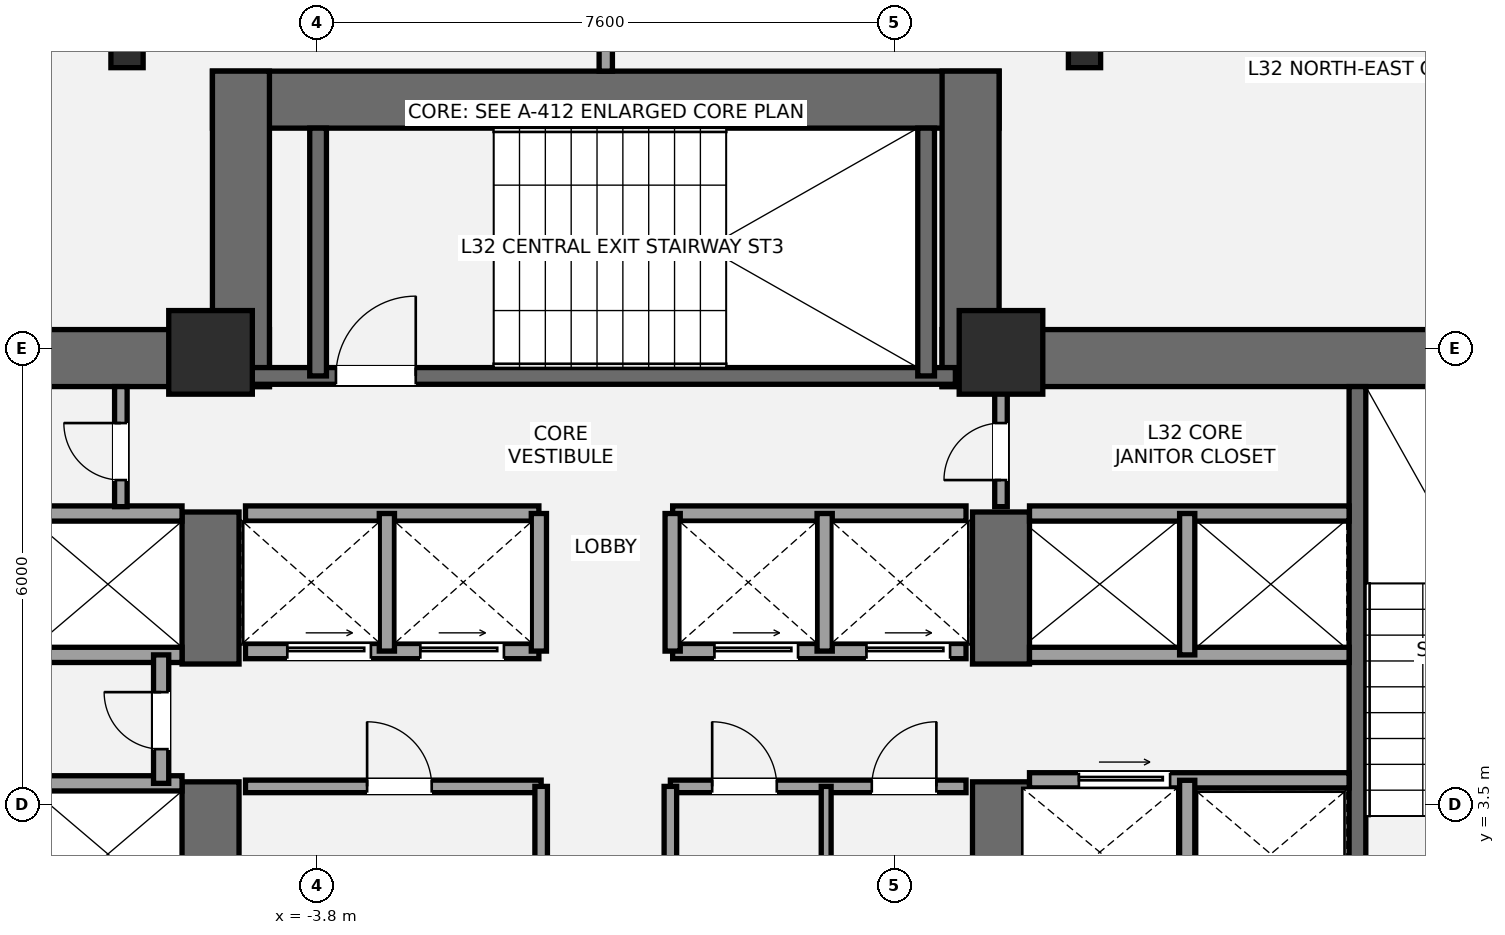
"""IFC4 building model, lengths in metres.
Left out: names, types, materials, properties, quantities, classifications, styles, units other than length and angle.
Written with IfcOpenShell. Run it as: python <this file> out.ifc"""

import sys

from ifc_helpers import new_model, si_unit, direction, frame, frame_2d, origin, origin_2d, place, context, subcontext, project, spatial, rectangle, i_section, extrude, element, fill, save


model = new_model("IFC4")
c1 = context("Model", 3, precision=1e-05, world=origin(), true_north=direction((0.0, 1.0)))
c2 = subcontext(c1, "Body", "Model", "MODEL_VIEW")
j1 = project(units=[si_unit("LENGTHUNIT", "METRE"), si_unit("PLANEANGLEUNIT", "RADIAN")], contexts=[c1])
p1 = place(None, origin())
s1 = spatial("IfcSite", under=j1, at=p1, CompositionType="ELEMENT")
p2 = place(p1, origin())
s2 = spatial("IfcBuilding", under=s1, at=p2, CompositionType="ELEMENT")
p3 = place(p2, frame((0.0, 0.0, 121.1)))
s3 = spatial("IfcBuildingStorey", under=s2, at=p3, CompositionType="ELEMENT", Elevation=121.1)
p4 = place(p3, frame((-13.9, 9.375, 0.0), z_axis=(0.0, 0.0, 1.0), x_axis=(1.0, 0.0, 0.0)))
e1 = element("IfcWall", 1, at=p4, inside=s3, PredefinedType="SHEAR", context=c2, shape_type="SweptSolid", body=[
    extrude(rectangle(XDim=9.475, YDim=0.75, at=frame_2d((4.737, 0.0))), origin(), (0.0, 0.0, 1.0), 3.5),
])
p5 = place(p3, frame((-5.2, 1.1, 0.0), z_axis=(0.0, 0.0, 1.0), x_axis=(0.0, 1.0, 0.0)))
e2 = element("IfcWall", 2, at=p5, inside=s3, PredefinedType="SHEAR", context=c2, shape_type="SweptSolid", body=[
    extrude(rectangle(XDim=2.7, YDim=0.75, at=frame_2d((1.35, 0.0))), origin(), (0.0, 0.0, 1.0), 3.5),
])
p6 = place(p3, frame((-5.2, 5.35, 0.0), z_axis=(0.0, 0.0, 1.0), x_axis=(0.0, 1.0, 0.0)))
e3 = element("IfcWall", 3, at=p6, inside=s3, PredefinedType="SHEAR", context=c2, shape_type="SweptSolid", body=[
    extrude(rectangle(XDim=2.0, YDim=0.75, at=frame_2d((1.0, 0.0))), origin(), (0.0, 0.0, 1.0), 3.5),
])
p7 = place(p3, frame((4.425, 9.375, 0.0), z_axis=(0.0, 0.0, 1.0), x_axis=(1.0, 0.0, 0.0)))
e4 = element("IfcWall", 4, at=p7, inside=s3, PredefinedType="SHEAR", context=c2, shape_type="SweptSolid", body=[
    extrude(rectangle(XDim=9.475, YDim=0.75, at=frame_2d((4.737, 0.0))), origin(), (0.0, 0.0, 1.0), 3.5),
])
p8 = place(p3, frame((5.2, 1.1, 0.0), z_axis=(0.0, 0.0, 1.0), x_axis=(0.0, 1.0, 0.0)))
e5 = element("IfcWall", 5, at=p8, inside=s3, PredefinedType="SHEAR", context=c2, shape_type="SweptSolid", body=[
    extrude(rectangle(XDim=2.7, YDim=0.75, at=frame_2d((1.35, 0.0))), origin(), (0.0, 0.0, 1.0), 3.5),
])
p9 = place(p3, frame((5.2, 5.35, 0.0), z_axis=(0.0, 0.0, 1.0), x_axis=(0.0, 1.0, 0.0)))
e6 = element("IfcWall", 6, at=p9, inside=s3, PredefinedType="SHEAR", context=c2, shape_type="SweptSolid", body=[
    extrude(rectangle(XDim=2.0, YDim=0.75, at=frame_2d((1.0, 0.0))), origin(), (0.0, 0.0, 1.0), 3.5),
])
p10 = place(p3, frame((9.89, 1.85, 0.0), z_axis=(0.0, 0.0, 1.0), x_axis=(0.0, 1.0, 0.0)))
e7 = element("IfcWall", 7, at=p10, inside=s3, PredefinedType="SHEAR", context=c2, shape_type="SweptSolid", body=[
    extrude(rectangle(XDim=7.15, YDim=0.22, at=frame_2d((3.575, 0.0))), origin(), (0.0, 0.0, 1.0), 3.5),
])
p11 = place(p3, frame((-5.175, 12.775, 0.0), z_axis=(0.0, 0.0, 1.0), x_axis=(1.0, 0.0, 0.0)))
e8 = element("IfcWall", 8, at=p11, inside=s3, PredefinedType="SHEAR", context=c2, shape_type="SweptSolid", body=[
    extrude(rectangle(XDim=10.35, YDim=0.75, at=frame_2d((5.175, 0.0))), origin(), (0.0, 0.0, 1.0), 3.5),
])
for number, where, z_axis, x_axis in (
    (9, (-4.8, 9.0, 0.0), (0.0, 0.0, 1.0), (0.0, 1.0, 0.0)),
    (10, (4.8, 9.0, 0.0), (0.0, 0.0, 1.0), (0.0, 1.0, 0.0)),
):
    element("IfcWall", number, at=place(p3, frame(where, z_axis=z_axis, x_axis=x_axis)), inside=s3, PredefinedType="SHEAR", context=c2, shape_type="SweptSolid", body=[
        extrude(rectangle(XDim=4.15, YDim=0.75, at=frame_2d((2.075, 0.0))), origin(), (0.0, 0.0, 1.0), 3.5),
    ])
p12 = place(p3, frame((-4.7, 9.14, 0.0), z_axis=(0.0, 0.0, 1.0), x_axis=(1.0, 0.0, 0.0)))
e11 = element("IfcWall", 11, at=p12, inside=s3, PredefinedType="SHEAR", context=c2, shape_type="SweptSolid", body=[
    extrude(rectangle(XDim=9.3, YDim=0.22, at=frame_2d((4.65, 0.0))), origin(), (0.0, 0.0, 1.0), 3.5),
])
p13 = place(p12, frame((1.15, 0.0, 0.0)))
e12 = element("IfcOpeningElement", 12, at=p13, cuts=e11, PredefinedType="OPENING", context=c2, shape_type="SweptSolid", body=[
    extrude(rectangle(XDim=1.05, YDim=2.15, at=frame_2d((0.525, 1.075))), frame((0.0, 0.12, 0.0), z_axis=(0.0, -1.0, 0.0), x_axis=(1.0, 0.0, 0.0)), (0.0, 0.0, 1.0), 0.24),
])
for number, where, z_axis, x_axis in (
    (13, (-3.785, 9.14, 0.0), (0.0, 0.0, 1.0), (0.0, 1.0, 0.0)),
    (14, (4.215, 9.14, 0.0), (0.0, 0.0, 1.0), (0.0, 1.0, 0.0)),
):
    element("IfcWall", number, at=place(p3, frame(where, z_axis=z_axis, x_axis=x_axis)), inside=s3, PredefinedType="SHEAR", context=c2, shape_type="SweptSolid", body=[
        extrude(rectangle(XDim=3.26, YDim=0.22, at=frame_2d((1.63, 0.0))), origin(), (0.0, 0.0, 1.0), 3.5),
    ])
for number, where, z_axis, x_axis in (
    (15, (-5.2, 9.45, 0.0), (0.0, 0.0, 1.0), (1.0, 0.0, 0.0)),
    (16, (5.2, 9.45, 0.0), (0.0, 0.0, 1.0), (1.0, 0.0, 0.0)),
):
    element("IfcColumn", number, at=place(p3, frame(where, z_axis=z_axis, x_axis=x_axis)), inside=s3, PredefinedType="COLUMN", context=c2, shape_type="SweptSolid", body=[
        extrude(rectangle(XDim=1.1, YDim=1.1, at=origin_2d()), origin(), (0.0, 0.0, 1.0), 3.5),
    ])
for number, where, z_axis, x_axis in (
    (17, (6.299, 13.433, 0.0), (0.0, 0.0, 1.0), (1.0, 0.0, 0.0)),
    (18, (-6.299, 13.433, 0.0), (0.0, 0.0, 1.0), (1.0, 0.0, 0.0)),
):
    element("IfcColumn", number, at=place(p3, frame(where, z_axis=z_axis, x_axis=x_axis)), inside=s3, PredefinedType="COLUMN", context=c2, shape_type="SweptSolid", body=[
        extrude(i_section(OverallWidth=0.424, OverallDepth=0.474, WebThickness=0.048, FlangeThickness=0.077, at=origin_2d()), origin(), (0.0, 0.0, 1.0), 3.5),
    ])
for number, where, z_axis, x_axis in (
    (19, (-9.78, 3.78, 0.0), (0.0, 0.0, 1.0), (1.0, 0.0, 0.0)),
    (20, (-9.78, 5.47, 0.0), (0.0, 0.0, 1.0), (1.0, 0.0, 0.0)),
    (21, (-9.78, 7.33, 0.0), (0.0, 0.0, 1.0), (1.0, 0.0, 0.0)),
):
    element("IfcWall", number, at=place(p3, frame(where, z_axis=z_axis, x_axis=x_axis)), inside=s3, PredefinedType="SOLIDWALL", context=c2, shape_type="SweptSolid", body=[
        extrude(rectangle(XDim=4.205, YDim=0.2, at=frame_2d((2.103, 0.0))), origin(), (0.0, 0.0, 1.0), 3.31),
    ])
p14 = place(p3, frame((-5.85, 3.78, 0.0), z_axis=(0.0, 0.0, 1.0), x_axis=(0.0, 1.0, 0.0)))
e22 = element("IfcWall", 22, at=p14, inside=s3, PredefinedType="SOLIDWALL", context=c2, shape_type="SweptSolid", body=[
    extrude(rectangle(XDim=1.69, YDim=0.2, at=frame_2d((0.845, 0.0))), origin(), (0.0, 0.0, 1.0), 3.31),
])
p15 = place(p14, frame((0.45, 0.0, 0.0)))
e23 = element("IfcOpeningElement", 23, at=p15, cuts=e22, PredefinedType="OPENING", context=c2, shape_type="SweptSolid", body=[
    extrude(rectangle(XDim=0.75, YDim=2.1, at=frame_2d((0.375, 1.05))), frame((0.0, 0.11, 0.0), z_axis=(0.0, -1.0, 0.0), x_axis=(1.0, 0.0, 0.0)), (0.0, 0.0, 1.0), 0.22),
])
p16 = place(p3, frame((5.575, 3.82, 0.0), z_axis=(0.0, 0.0, 1.0), x_axis=(1.0, 0.0, 0.0)))
e24 = element("IfcWall", 24, at=p16, inside=s3, PredefinedType="SOLIDWALL", context=c2, shape_type="SweptSolid", body=[
    extrude(rectangle(XDim=4.205, YDim=0.2, at=frame_2d((2.103, 0.0))), origin(), (0.0, 0.0, 1.0), 3.31),
])
p17 = place(p16, frame((0.65, 0.0, 0.0)))
e25 = element("IfcOpeningElement", 25, at=p17, cuts=e24, PredefinedType="OPENING", context=c2, shape_type="SweptSolid", body=[
    extrude(rectangle(XDim=1.2, YDim=2.2, at=frame_2d((0.6, 1.1))), frame((0.0, 0.11, 0.0), z_axis=(0.0, -1.0, 0.0), x_axis=(1.0, 0.0, 0.0)), (0.0, 0.0, 1.0), 0.22),
])
p18 = place(p3, frame((7.65, 1.85, 0.0), z_axis=(0.0, 0.0, 1.0), x_axis=(0.0, 1.0, 0.0)))
e26 = element("IfcWall", 26, at=p18, inside=s3, PredefinedType="SOLIDWALL", context=c2, shape_type="SweptSolid", body=[
    extrude(rectangle(XDim=1.97, YDim=0.2, at=frame_2d((0.985, 0.0))), origin(), (0.0, 0.0, 1.0), 3.31),
])
for number, where, z_axis, x_axis in (
    (27, (5.575, 5.47, 0.0), (0.0, 0.0, 1.0), (1.0, 0.0, 0.0)),
    (28, (5.575, 7.33, 0.0), (0.0, 0.0, 1.0), (1.0, 0.0, 0.0)),
):
    element("IfcWall", number, at=place(p3, frame(where, z_axis=z_axis, x_axis=x_axis)), inside=s3, PredefinedType="SOLIDWALL", context=c2, shape_type="SweptSolid", body=[
        extrude(rectangle(XDim=4.205, YDim=0.2, at=frame_2d((2.103, 0.0))), origin(), (0.0, 0.0, 1.0), 3.31),
    ])
p19 = place(p3, frame((7.65, 5.47, 0.0), z_axis=(0.0, 0.0, 1.0), x_axis=(0.0, 1.0, 0.0)))
e29 = element("IfcWall", 29, at=p19, inside=s3, PredefinedType="SOLIDWALL", context=c2, shape_type="SweptSolid", body=[
    extrude(rectangle(XDim=1.86, YDim=0.2, at=frame_2d((0.93, 0.0))), origin(), (0.0, 0.0, 1.0), 3.31),
])
p20 = place(p3, frame((-4.74, 3.74, 0.0), z_axis=(0.0, 0.0, 1.0), x_axis=(1.0, 0.0, 0.0)))
e30 = element("IfcWall", 30, at=p20, inside=s3, PredefinedType="PARTITIONING", context=c2, shape_type="SweptSolid", body=[
    extrude(rectangle(XDim=3.89, YDim=0.165, at=frame_2d((1.945, 0.0))), origin(), (0.0, 0.0, 1.0), 3.31),
])
p21 = place(p20, frame((1.6, 0.0, 0.0)))
e31 = element("IfcOpeningElement", 31, at=p21, cuts=e30, PredefinedType="OPENING", context=c2, shape_type="SweptSolid", body=[
    extrude(rectangle(XDim=0.85, YDim=2.1, at=frame_2d((0.425, 1.05))), frame((0.0, 0.093, 0.0), z_axis=(0.0, -1.0, 0.0), x_axis=(1.0, 0.0, 0.0)), (0.0, 0.0, 1.0), 0.185),
])
p22 = place(p3, frame((-0.85, 1.92, 0.0), z_axis=(0.0, 0.0, 1.0), x_axis=(0.0, 1.0, 0.0)))
e32 = element("IfcWall", 32, at=p22, inside=s3, PredefinedType="PARTITIONING", context=c2, shape_type="SweptSolid", body=[
    extrude(rectangle(XDim=1.82, YDim=0.165, at=frame_2d((0.91, 0.0))), origin(), (0.0, 0.0, 1.0), 3.31),
])
p23 = place(p3, frame((0.85, 3.74, 0.0), z_axis=(0.0, 0.0, 1.0), x_axis=(1.0, 0.0, 0.0)))
e33 = element("IfcWall", 33, at=p23, inside=s3, PredefinedType="PARTITIONING", context=c2, shape_type="SweptSolid", body=[
    extrude(rectangle(XDim=3.89, YDim=0.165, at=frame_2d((1.945, 0.0))), origin(), (0.0, 0.0, 1.0), 3.31),
])
p24 = place(p23, frame((0.55, 0.0, 0.0)))
e34 = element("IfcOpeningElement", 34, at=p24, cuts=e33, PredefinedType="OPENING", context=c2, shape_type="SweptSolid", body=[
    extrude(rectangle(XDim=0.85, YDim=2.1, at=frame_2d((0.425, 1.05))), frame((0.0, 0.093, 0.0), z_axis=(0.0, -1.0, 0.0), x_axis=(1.0, 0.0, 0.0)), (0.0, 0.0, 1.0), 0.185),
])
p25 = place(p23, frame((2.65, 0.0, 0.0)))
e35 = element("IfcOpeningElement", 35, at=p25, cuts=e33, PredefinedType="OPENING", context=c2, shape_type="SweptSolid", body=[
    extrude(rectangle(XDim=0.85, YDim=2.1, at=frame_2d((0.425, 1.05))), frame((0.0, 0.093, 0.0), z_axis=(0.0, -1.0, 0.0), x_axis=(1.0, 0.0, 0.0)), (0.0, 0.0, 1.0), 0.185),
])
p26 = place(p3, frame((0.85, 1.92, 0.0), z_axis=(0.0, 0.0, 1.0), x_axis=(0.0, 1.0, 0.0)))
e36 = element("IfcWall", 36, at=p26, inside=s3, PredefinedType="PARTITIONING", context=c2, shape_type="SweptSolid", body=[
    extrude(rectangle(XDim=1.82, YDim=0.165, at=frame_2d((0.91, 0.0))), origin(), (0.0, 0.0, 1.0), 3.31),
])
p27 = place(p3, frame((2.9, 1.92, 0.0), z_axis=(0.0, 0.0, 1.0), x_axis=(0.0, 1.0, 0.0)))
e37 = element("IfcWall", 37, at=p27, inside=s3, PredefinedType="PARTITIONING", context=c2, shape_type="SweptSolid", body=[
    extrude(rectangle(XDim=1.82, YDim=0.13, at=frame_2d((0.91, 0.0))), origin(), (0.0, 0.0, 1.0), 3.31),
])
p28 = place(p3, frame((-4.74, 5.52, 0.0), z_axis=(0.0, 0.0, 1.0), x_axis=(1.0, 0.0, 0.0)))
e38 = element("IfcWall", 38, at=p28, inside=s3, PredefinedType="SOLIDWALL", context=c2, shape_type="SweptSolid", body=[
    extrude(rectangle(XDim=3.86, YDim=0.2, at=frame_2d((1.93, 0.0))), origin(), (0.0, 0.0, 1.0), 3.31),
])
p29 = place(p28, frame((0.55, 0.0, 0.0)))
e39 = element("IfcOpeningElement", 39, at=p29, cuts=e38, PredefinedType="OPENING", context=c2, shape_type="SweptSolid", body=[
    extrude(rectangle(XDim=1.1, YDim=2.2, at=frame_2d((0.55, 1.1))), frame((0.0, 0.11, 0.0), z_axis=(0.0, -1.0, 0.0), x_axis=(1.0, 0.0, 0.0)), (0.0, 0.0, 1.0), 0.22),
])
p30 = place(p28, frame((2.3, 0.0, 0.0)))
e40 = element("IfcOpeningElement", 40, at=p30, cuts=e38, PredefinedType="OPENING", context=c2, shape_type="SweptSolid", body=[
    extrude(rectangle(XDim=1.1, YDim=2.2, at=frame_2d((0.55, 1.1))), frame((0.0, 0.11, 0.0), z_axis=(0.0, -1.0, 0.0), x_axis=(1.0, 0.0, 0.0)), (0.0, 0.0, 1.0), 0.22),
])
p31 = place(p3, frame((0.88, 5.52, 0.0), z_axis=(0.0, 0.0, 1.0), x_axis=(1.0, 0.0, 0.0)))
e41 = element("IfcWall", 41, at=p31, inside=s3, PredefinedType="SOLIDWALL", context=c2, shape_type="SweptSolid", body=[
    extrude(rectangle(XDim=3.86, YDim=0.2, at=frame_2d((1.93, 0.0))), origin(), (0.0, 0.0, 1.0), 3.31),
])
p32 = place(p31, frame((0.55, 0.0, 0.0)))
e42 = element("IfcOpeningElement", 42, at=p32, cuts=e41, PredefinedType="OPENING", context=c2, shape_type="SweptSolid", body=[
    extrude(rectangle(XDim=1.1, YDim=2.2, at=frame_2d((0.55, 1.1))), frame((0.0, 0.11, 0.0), z_axis=(0.0, -1.0, 0.0), x_axis=(1.0, 0.0, 0.0)), (0.0, 0.0, 1.0), 0.22),
])
p33 = place(p31, frame((2.55, 0.0, 0.0)))
e43 = element("IfcOpeningElement", 43, at=p33, cuts=e41, PredefinedType="OPENING", context=c2, shape_type="SweptSolid", body=[
    extrude(rectangle(XDim=1.1, YDim=2.2, at=frame_2d((0.55, 1.1))), frame((0.0, 0.11, 0.0), z_axis=(0.0, -1.0, 0.0), x_axis=(1.0, 0.0, 0.0)), (0.0, 0.0, 1.0), 0.22),
])
for number, where, z_axis, x_axis in (
    (44, (-4.74, 7.33, 0.0), (0.0, 0.0, 1.0), (1.0, 0.0, 0.0)),
    (45, (0.88, 7.33, 0.0), (0.0, 0.0, 1.0), (1.0, 0.0, 0.0)),
):
    element("IfcWall", number, at=place(p3, frame(where, z_axis=z_axis, x_axis=x_axis)), inside=s3, PredefinedType="SOLIDWALL", context=c2, shape_type="SweptSolid", body=[
        extrude(rectangle(XDim=3.86, YDim=0.2, at=frame_2d((1.93, 0.0))), origin(), (0.0, 0.0, 1.0), 3.31),
    ])
for number, where, z_axis, x_axis in (
    (46, (-2.88, 5.52, 0.0), (0.0, 0.0, 1.0), (0.0, 1.0, 0.0)),
    (47, (2.88, 5.52, 0.0), (0.0, 0.0, 1.0), (0.0, 1.0, 0.0)),
    (48, (-0.88, 5.52, 0.0), (0.0, 0.0, 1.0), (0.0, 1.0, 0.0)),
    (49, (0.88, 5.52, 0.0), (0.0, 0.0, 1.0), (0.0, 1.0, 0.0)),
):
    element("IfcWall", number, at=place(p3, frame(where, z_axis=z_axis, x_axis=x_axis)), inside=s3, PredefinedType="SOLIDWALL", context=c2, shape_type="SweptSolid", body=[
        extrude(rectangle(XDim=1.81, YDim=0.2, at=frame_2d((0.905, 0.0))), origin(), (0.0, 0.0, 1.0), 3.31),
    ])
p34 = place(p3, frame((-6.38, 7.42, 0.0), z_axis=(0.0, 0.0, 1.0), x_axis=(0.0, 1.0, 0.0)))
e50 = element("IfcWall", 50, at=p34, inside=s3, PredefinedType="PARTITIONING", context=c2, shape_type="SweptSolid", body=[
    extrude(rectangle(XDim=1.58, YDim=0.165, at=frame_2d((0.79, 0.0))), origin(), (0.0, 0.0, 1.0), 3.31),
])
p35 = place(p34, frame((0.35, 0.0, 0.0)))
e51 = element("IfcOpeningElement", 51, at=p35, cuts=e50, PredefinedType="OPENING", context=c2, shape_type="SweptSolid", body=[
    extrude(rectangle(XDim=0.75, YDim=2.1, at=frame_2d((0.375, 1.05))), frame((0.0, 0.093, 0.0), z_axis=(0.0, -1.0, 0.0), x_axis=(1.0, 0.0, 0.0)), (0.0, 0.0, 1.0), 0.185),
])
p36 = place(p3, frame((5.2, 7.42, 0.0), z_axis=(0.0, 0.0, 1.0), x_axis=(0.0, 1.0, 0.0)))
e52 = element("IfcWall", 52, at=p36, inside=s3, PredefinedType="PARTITIONING", context=c2, shape_type="SweptSolid", body=[
    extrude(rectangle(XDim=1.58, YDim=0.165, at=frame_2d((0.79, 0.0))), origin(), (0.0, 0.0, 1.0), 3.31),
])
p37 = place(p36, frame((0.35, 0.0, 0.0)))
e53 = element("IfcOpeningElement", 53, at=p37, cuts=e52, PredefinedType="OPENING", context=c2, shape_type="SweptSolid", body=[
    extrude(rectangle(XDim=0.75, YDim=2.1, at=frame_2d((0.375, 1.05))), frame((0.0, 0.093, 0.0), z_axis=(0.0, -1.0, 0.0), x_axis=(1.0, 0.0, 0.0)), (0.0, 0.0, 1.0), 0.185),
])
p38 = place(p3, frame((0.0, 13.15, 0.0), z_axis=(0.0, 0.0, 1.0), x_axis=(0.0, 1.0, 0.0)))
e54 = element("IfcWall", 54, at=p38, inside=s3, PredefinedType="PARTITIONING", context=c2, shape_type="SweptSolid", body=[
    extrude(rectangle(XDim=4.181, YDim=0.175, at=frame_2d((2.09, 0.0))), origin(), (0.0, 0.0, 1.0), 3.31),
])
p39 = place(p13, origin())
e55 = element("IfcDoor", 55, at=p39, inside=s3, OperationType="SINGLE_SWING_RIGHT", PredefinedType="DOOR", context=c2, shape_type="SweptSolid", body=[
    extrude(rectangle(XDim=1.05, YDim=2.15, at=frame_2d((0.525, 1.075))), frame((0.0, 0.025, 0.0), z_axis=(0.0, -1.0, 0.0), x_axis=(1.0, 0.0, 0.0)), (0.0, 0.0, 1.0), 0.05),
])
fill(e12, e55)
p40 = place(p15, origin())
e56 = element("IfcDoor", 56, at=p40, inside=s3, OperationType="SINGLE_SWING_RIGHT", PredefinedType="DOOR", context=c2, shape_type="SweptSolid", body=[
    extrude(rectangle(XDim=0.75, YDim=2.1, at=frame_2d((0.375, 1.05))), frame((0.0, 0.025, 0.0), z_axis=(0.0, -1.0, 0.0), x_axis=(1.0, 0.0, 0.0)), (0.0, 0.0, 1.0), 0.05),
])
fill(e23, e56)
p41 = place(p17, origin())
e57 = element("IfcDoor", 57, at=p41, inside=s3, OperationType="SLIDING_TO_RIGHT", PredefinedType="DOOR", context=c2, shape_type="SweptSolid", body=[
    extrude(rectangle(XDim=1.2, YDim=2.2, at=frame_2d((0.6, 1.1))), frame((0.0, 0.025, 0.0), z_axis=(0.0, -1.0, 0.0), x_axis=(1.0, 0.0, 0.0)), (0.0, 0.0, 1.0), 0.05),
])
fill(e25, e57)
p42 = place(p21, origin())
e58 = element("IfcDoor", 58, at=p42, inside=s3, OperationType="SINGLE_SWING_LEFT", PredefinedType="DOOR", context=c2, shape_type="SweptSolid", body=[
    extrude(rectangle(XDim=0.85, YDim=2.1, at=frame_2d((0.425, 1.05))), frame((0.0, 0.025, 0.0), z_axis=(0.0, -1.0, 0.0), x_axis=(1.0, 0.0, 0.0)), (0.0, 0.0, 1.0), 0.05),
])
fill(e31, e58)
p43 = place(p24, origin())
e59 = element("IfcDoor", 59, at=p43, inside=s3, OperationType="SINGLE_SWING_LEFT", PredefinedType="DOOR", context=c2, shape_type="SweptSolid", body=[
    extrude(rectangle(XDim=0.85, YDim=2.1, at=frame_2d((0.425, 1.05))), frame((0.0, 0.025, 0.0), z_axis=(0.0, -1.0, 0.0), x_axis=(1.0, 0.0, 0.0)), (0.0, 0.0, 1.0), 0.05),
])
fill(e34, e59)
p44 = place(p25, origin())
e60 = element("IfcDoor", 60, at=p44, inside=s3, OperationType="SINGLE_SWING_RIGHT", PredefinedType="DOOR", context=c2, shape_type="SweptSolid", body=[
    extrude(rectangle(XDim=0.85, YDim=2.1, at=frame_2d((0.425, 1.05))), frame((0.0, 0.025, 0.0), z_axis=(0.0, -1.0, 0.0), x_axis=(1.0, 0.0, 0.0)), (0.0, 0.0, 1.0), 0.05),
])
fill(e35, e60)
p45 = place(p29, origin())
e61 = element("IfcDoor", 61, at=p45, inside=s3, OperationType="SLIDING_TO_LEFT", PredefinedType="DOOR", context=c2, shape_type="SweptSolid", body=[
    extrude(rectangle(XDim=1.1, YDim=2.2, at=frame_2d((0.55, 1.1))), frame((0.0, 0.025, 0.0), z_axis=(0.0, -1.0, 0.0), x_axis=(1.0, 0.0, 0.0)), (0.0, 0.0, 1.0), 0.05),
])
fill(e39, e61)
p46 = place(p30, origin())
e62 = element("IfcDoor", 62, at=p46, inside=s3, OperationType="SLIDING_TO_LEFT", PredefinedType="DOOR", context=c2, shape_type="SweptSolid", body=[
    extrude(rectangle(XDim=1.1, YDim=2.2, at=frame_2d((0.55, 1.1))), frame((0.0, 0.025, 0.0), z_axis=(0.0, -1.0, 0.0), x_axis=(1.0, 0.0, 0.0)), (0.0, 0.0, 1.0), 0.05),
])
fill(e40, e62)
p47 = place(p32, origin())
e63 = element("IfcDoor", 63, at=p47, inside=s3, OperationType="SLIDING_TO_LEFT", PredefinedType="DOOR", context=c2, shape_type="SweptSolid", body=[
    extrude(rectangle(XDim=1.1, YDim=2.2, at=frame_2d((0.55, 1.1))), frame((0.0, 0.025, 0.0), z_axis=(0.0, -1.0, 0.0), x_axis=(1.0, 0.0, 0.0)), (0.0, 0.0, 1.0), 0.05),
])
fill(e42, e63)
p48 = place(p33, origin())
e64 = element("IfcDoor", 64, at=p48, inside=s3, OperationType="SLIDING_TO_LEFT", PredefinedType="DOOR", context=c2, shape_type="SweptSolid", body=[
    extrude(rectangle(XDim=1.1, YDim=2.2, at=frame_2d((0.55, 1.1))), frame((0.0, 0.025, 0.0), z_axis=(0.0, -1.0, 0.0), x_axis=(1.0, 0.0, 0.0)), (0.0, 0.0, 1.0), 0.05),
])
fill(e43, e64)
p49 = place(p35, origin())
e65 = element("IfcDoor", 65, at=p49, inside=s3, OperationType="SINGLE_SWING_RIGHT", PredefinedType="DOOR", context=c2, shape_type="SweptSolid", body=[
    extrude(rectangle(XDim=0.75, YDim=2.1, at=frame_2d((0.375, 1.05))), frame((0.0, 0.025, 0.0), z_axis=(0.0, -1.0, 0.0), x_axis=(1.0, 0.0, 0.0)), (0.0, 0.0, 1.0), 0.05),
])
fill(e51, e65)
p50 = place(p37, origin())
e66 = element("IfcDoor", 66, at=p50, inside=s3, OperationType="SINGLE_SWING_LEFT", PredefinedType="DOOR", context=c2, shape_type="SweptSolid", body=[
    extrude(rectangle(XDim=0.75, YDim=2.1, at=frame_2d((0.375, 1.05))), frame((0.0, 0.025, 0.0), z_axis=(0.0, -1.0, 0.0), x_axis=(1.0, 0.0, 0.0)), (0.0, 0.0, 1.0), 0.05),
])
fill(e53, e66)
save(model, sys.argv[1])
